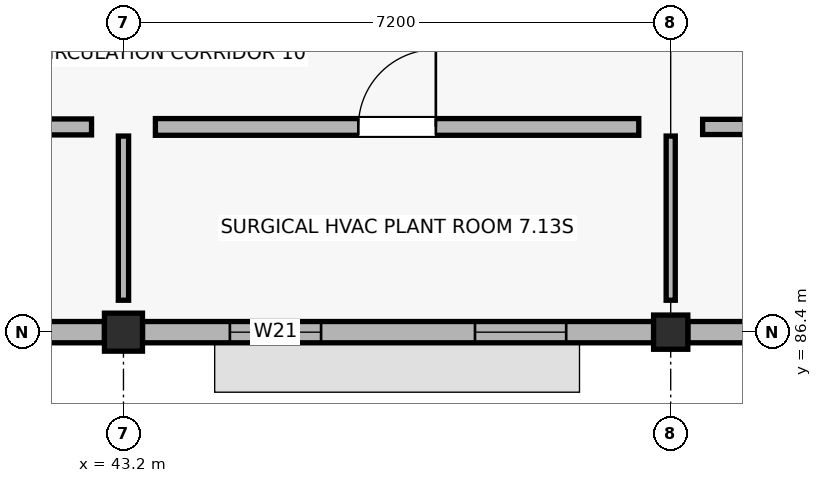
"""IFC4 building model, lengths in metres.
Left out: names, types, materials, properties, quantities, classifications, styles, units other than length and angle.
Written with IfcOpenShell. Run it as: python <this file> out.ifc"""

import sys

from ifc_helpers import new_model, si_unit, direction, frame, frame_2d, origin, origin_2d, place, context, subcontext, project, spatial, rectangle, extrude, element, fill, save


model = new_model("IFC4")
c1 = context("Model", 3, precision=1e-05, world=origin(), true_north=direction((0.0, 1.0)))
c2 = subcontext(c1, "Body", "Model", "MODEL_VIEW")
j1 = project(units=[si_unit("LENGTHUNIT", "METRE"), si_unit("PLANEANGLEUNIT", "RADIAN")], contexts=[c1])
p1 = place(None, origin())
s1 = spatial("IfcSite", under=j1, at=p1, CompositionType="ELEMENT")
p2 = place(p1, origin())
s2 = spatial("IfcBuilding", under=s1, at=p2, CompositionType="ELEMENT")
p3 = place(p2, frame((0.0, 0.0, 9.0)))
s3 = spatial("IfcBuildingStorey", under=s2, at=p3, CompositionType="ELEMENT", Elevation=9.0)
p4 = place(p3, frame((43.2, 86.4, 0.0), z_axis=(0.0, 0.0, 1.0), x_axis=(1.0, 0.0, 0.0)))
e1 = element("IfcColumn", 1, at=p4, inside=s3, PredefinedType="COLUMN", context=c2, shape_type="SweptSolid", body=[
    extrude(rectangle(XDim=0.5, YDim=0.5, at=origin_2d()), origin(), (0.0, 0.0, 1.0), 4.28),
])
p5 = place(p3, frame((50.4, 86.4, 0.0), z_axis=(0.0, 0.0, 1.0), x_axis=(1.0, 0.0, 0.0)))
e2 = element("IfcColumn", 2, at=p5, inside=s3, PredefinedType="COLUMN", context=c2, shape_type="SweptSolid", body=[
    extrude(rectangle(XDim=0.45, YDim=0.45, at=origin_2d()), origin(), (0.0, 0.0, 1.0), 4.28),
])
p6 = place(p3, frame((36.225, 86.4, 0.0), z_axis=(0.0, 0.0, 1.0), x_axis=(1.0, 0.0, 0.0)))
e3 = element("IfcWall", 3, at=p6, inside=s3, PredefinedType="STANDARD", context=c2, shape_type="SweptSolid", body=[
    extrude(rectangle(XDim=6.725, YDim=0.28, at=frame_2d((3.362, 0.0))), origin(), (0.0, 0.0, 1.0), 3.59),
])
p7 = place(p6, frame((1.0, 0.0, 0.9)))
e4 = element("IfcOpeningElement", 4, at=p7, cuts=e3, PredefinedType="OPENING", context=c2, shape_type="SweptSolid", body=[
    extrude(rectangle(XDim=1.5, YDim=1.38, at=frame_2d((0.75, 0.69))), frame((0.0, 0.15, 0.0), z_axis=(0.0, -1.0, 0.0), x_axis=(1.0, 0.0, 0.0)), (0.0, 0.0, 1.0), 0.3),
])
p8 = place(p6, frame((4.225, 0.0, 0.9)))
e5 = element("IfcOpeningElement", 5, at=p8, cuts=e3, PredefinedType="OPENING", context=c2, shape_type="SweptSolid", body=[
    extrude(rectangle(XDim=1.5, YDim=1.38, at=frame_2d((0.75, 0.69))), frame((0.0, 0.15, 0.0), z_axis=(0.0, -1.0, 0.0), x_axis=(1.0, 0.0, 0.0)), (0.0, 0.0, 1.0), 0.3),
])
p9 = place(p3, frame((43.45, 86.4, 0.0), z_axis=(0.0, 0.0, 1.0), x_axis=(1.0, 0.0, 0.0)))
e6 = element("IfcWall", 6, at=p9, inside=s3, PredefinedType="STANDARD", context=c2, shape_type="SweptSolid", body=[
    extrude(rectangle(XDim=6.725, YDim=0.28, at=frame_2d((3.363, 0.0))), origin(), (0.0, 0.0, 1.0), 3.59),
])
p10 = place(p9, frame((1.15, 0.0, 0.9)))
e7 = element("IfcOpeningElement", 7, at=p10, cuts=e6, PredefinedType="OPENING", context=c2, shape_type="SweptSolid", body=[
    extrude(rectangle(XDim=1.2, YDim=1.5, at=frame_2d((0.6, 0.75))), frame((0.0, 0.15, 0.0), z_axis=(0.0, -1.0, 0.0), x_axis=(1.0, 0.0, 0.0)), (0.0, 0.0, 1.0), 0.3),
])
p11 = place(p9, frame((4.375, 0.0, 0.9)))
e8 = element("IfcOpeningElement", 8, at=p11, cuts=e6, PredefinedType="OPENING", context=c2, shape_type="SweptSolid", body=[
    extrude(rectangle(XDim=1.2, YDim=1.5, at=frame_2d((0.6, 0.75))), frame((0.0, 0.15, 0.0), z_axis=(0.0, -1.0, 0.0), x_axis=(1.0, 0.0, 0.0)), (0.0, 0.0, 1.0), 0.3),
])
p12 = place(p3, frame((50.625, 86.4, 0.0), z_axis=(0.0, 0.0, 1.0), x_axis=(1.0, 0.0, 0.0)))
e9 = element("IfcWall", 9, at=p12, inside=s3, PredefinedType="STANDARD", context=c2, shape_type="SweptSolid", body=[
    extrude(rectangle(XDim=6.725, YDim=0.28, at=frame_2d((3.363, 0.0))), origin(), (0.0, 0.0, 1.0), 3.59),
])
p13 = place(p12, frame((1.3, 0.0, 0.9)))
e10 = element("IfcOpeningElement", 10, at=p13, cuts=e9, PredefinedType="OPENING", context=c2, shape_type="SweptSolid", body=[
    extrude(rectangle(XDim=0.9, YDim=1.62, at=frame_2d((0.45, 0.81))), frame((0.0, 0.15, 0.0), z_axis=(0.0, -1.0, 0.0), x_axis=(1.0, 0.0, 0.0)), (0.0, 0.0, 1.0), 0.3),
])
p14 = place(p12, frame((4.525, 0.0, 0.9)))
e11 = element("IfcOpeningElement", 11, at=p14, cuts=e9, PredefinedType="OPENING", context=c2, shape_type="SweptSolid", body=[
    extrude(rectangle(XDim=0.9, YDim=1.62, at=frame_2d((0.45, 0.81))), frame((0.0, 0.15, 0.0), z_axis=(0.0, -1.0, 0.0), x_axis=(1.0, 0.0, 0.0)), (0.0, 0.0, 1.0), 0.3),
])
p15 = place(p3, frame((36.42, 89.1, 0.0), z_axis=(0.0, 0.0, 1.0), x_axis=(1.0, 0.0, 0.0)))
e12 = element("IfcWall", 12, at=p15, inside=s3, PredefinedType="PLUMBINGWALL", context=c2, shape_type="SweptSolid", body=[
    extrude(rectangle(XDim=6.36, YDim=0.21, at=frame_2d((3.18, 0.0))), origin(), (0.0, 0.0, 1.0), 3.38),
])
p16 = place(p15, frame((2.51, 0.0, 0.0)))
e13 = element("IfcOpeningElement", 13, at=p16, cuts=e12, PredefinedType="OPENING", context=c2, shape_type="SweptSolid", body=[
    extrude(rectangle(XDim=1.34, YDim=2.14, at=frame_2d((0.67, 1.07))), frame((0.0, 0.115, 0.0), z_axis=(0.0, -1.0, 0.0), x_axis=(1.0, 0.0, 0.0)), (0.0, 0.0, 1.0), 0.23),
])
p17 = place(p3, frame((43.2, 86.82, 0.0), z_axis=(0.0, 0.0, 1.0), x_axis=(0.0, 1.0, 0.0)))
e14 = element("IfcWall", 14, at=p17, inside=s3, PredefinedType="PARTITIONING", context=c2, shape_type="SweptSolid", body=[
    extrude(rectangle(XDim=2.16, YDim=0.135, at=frame_2d((1.08, 0.0))), origin(), (0.0, 0.0, 1.0), 3.38),
])
p18 = place(p3, frame((43.62, 89.1, 0.0), z_axis=(0.0, 0.0, 1.0), x_axis=(1.0, 0.0, 0.0)))
e15 = element("IfcWall", 15, at=p18, inside=s3, PredefinedType="SOLIDWALL", context=c2, shape_type="SweptSolid", body=[
    extrude(rectangle(XDim=6.36, YDim=0.22, at=frame_2d((3.18, 0.0))), origin(), (0.0, 0.0, 1.0), 3.38),
])
p19 = place(p18, frame((2.67, 0.0, 0.0)))
e16 = element("IfcOpeningElement", 16, at=p19, cuts=e15, PredefinedType="OPENING", context=c2, shape_type="SweptSolid", body=[
    extrude(rectangle(XDim=1.02, YDim=2.19, at=frame_2d((0.51, 1.095))), frame((0.0, 0.12, 0.0), z_axis=(0.0, -1.0, 0.0), x_axis=(1.0, 0.0, 0.0)), (0.0, 0.0, 1.0), 0.24),
])
p20 = place(p3, frame((50.4, 86.82, 0.0), z_axis=(0.0, 0.0, 1.0), x_axis=(0.0, 1.0, 0.0)))
e17 = element("IfcWall", 17, at=p20, inside=s3, PredefinedType="PARTITIONING", context=c2, shape_type="SweptSolid", body=[
    extrude(rectangle(XDim=2.16, YDim=0.12, at=frame_2d((1.08, 0.0))), origin(), (0.0, 0.0, 1.0), 3.38),
])
p21 = place(p3, frame((50.82, 89.1, 0.0), z_axis=(0.0, 0.0, 1.0), x_axis=(1.0, 0.0, 0.0)))
e18 = element("IfcWall", 18, at=p21, inside=s3, PredefinedType="SOLIDWALL", context=c2, shape_type="SweptSolid", body=[
    extrude(rectangle(XDim=6.36, YDim=0.2, at=frame_2d((3.18, 0.0))), origin(), (0.0, 0.0, 1.0), 3.38),
])
p22 = place(p21, frame((2.55, 0.0, 0.0)))
e19 = element("IfcOpeningElement", 19, at=p22, cuts=e18, PredefinedType="OPENING", context=c2, shape_type="SweptSolid", body=[
    extrude(rectangle(XDim=1.26, YDim=2.19, at=frame_2d((0.63, 1.095))), frame((0.0, 0.11, 0.0), z_axis=(0.0, -1.0, 0.0), x_axis=(1.0, 0.0, 0.0)), (0.0, 0.0, 1.0), 0.22),
])
p23 = place(p10, origin())
e20 = element("IfcWindow", 20, at=p23, inside=s3, PartitioningType="SINGLE_PANEL", PredefinedType="WINDOW", context=c2, shape_type="SweptSolid", body=[
    extrude(rectangle(XDim=1.2, YDim=1.5, at=frame_2d((0.6, 0.75))), frame((0.0, 0.03, 0.0), z_axis=(0.0, -1.0, 0.0), x_axis=(1.0, 0.0, 0.0)), (0.0, 0.0, 1.0), 0.06),
])
fill(e7, e20)
p24 = place(p11, origin())
e21 = element("IfcWindow", 21, at=p24, inside=s3, PartitioningType="SINGLE_PANEL", PredefinedType="WINDOW", context=c2, shape_type="SweptSolid", body=[
    extrude(rectangle(XDim=1.2, YDim=1.5, at=frame_2d((0.6, 0.75))), frame((0.0, 0.03, 0.0), z_axis=(0.0, -1.0, 0.0), x_axis=(1.0, 0.0, 0.0)), (0.0, 0.0, 1.0), 0.06),
])
fill(e8, e21)
p25 = place(p19, origin())
e22 = element("IfcDoor", 22, at=p25, inside=s3, OperationType="SINGLE_SWING_RIGHT", PredefinedType="DOOR", context=c2, shape_type="SweptSolid", body=[
    extrude(rectangle(XDim=1.02, YDim=2.19, at=frame_2d((0.51, 1.095))), frame((0.0, 0.025, 0.0), z_axis=(0.0, -1.0, 0.0), x_axis=(1.0, 0.0, 0.0)), (0.0, 0.0, 1.0), 0.05),
])
fill(e16, e22)
save(model, sys.argv[1])
